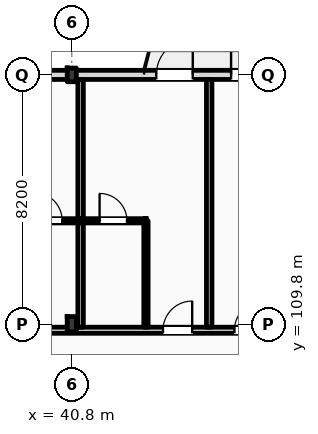
"""IFC4 building model, lengths in metres.
Left out: names, types, materials, properties, quantities, classifications, styles, units other than length and angle.
Written with IfcOpenShell. Run it as: python <this file> out.ifc"""

import sys

from ifc_helpers import new_model, si_unit, direction, frame, frame_2d, origin, origin_2d, place, context, subcontext, project, spatial, rectangle, i_section, extrude, element, fill, save


model = new_model("IFC4")
c1 = context("Model", 3, precision=1e-05, world=origin(), true_north=direction((0.0, 1.0)))
c2 = subcontext(c1, "Body", "Model", "MODEL_VIEW")
j1 = project(units=[si_unit("LENGTHUNIT", "METRE"), si_unit("PLANEANGLEUNIT", "RADIAN")], contexts=[c1])
p1 = place(None, origin())
s1 = spatial("IfcSite", under=j1, at=p1, CompositionType="ELEMENT")
p2 = place(p1, origin())
s2 = spatial("IfcBuilding", under=s1, at=p2, CompositionType="ELEMENT")
p3 = place(p2, frame((0.0, 0.0, 35.4)))
s3 = spatial("IfcBuildingStorey", under=s2, at=p3, CompositionType="ELEMENT", Elevation=35.4)
p4 = place(p3, frame((40.8, 109.8, 0.0), z_axis=(0.0, 0.0, 1.0), x_axis=(1.0, 0.0, 0.0)))
e1 = element("IfcColumn", 1, at=p4, inside=s3, PredefinedType="COLUMN", context=c2, shape_type="SweptSolid", body=[
    extrude(i_section(OverallWidth=0.3, OverallDepth=0.5, WebThickness=0.014, FlangeThickness=0.028, FilletRadius=0.027, at=origin_2d()), origin(), (0.0, 0.0, 1.0), 3.6),
])
p5 = place(p3, frame((40.8, 118.0, 0.0), z_axis=(0.0, 0.0, 1.0), x_axis=(1.0, 0.0, 0.0)))
e2 = element("IfcColumn", 2, at=p5, inside=s3, PredefinedType="COLUMN", context=c2, shape_type="SweptSolid", body=[
    extrude(i_section(OverallWidth=0.3, OverallDepth=0.45, WebThickness=0.014, FlangeThickness=0.026, FilletRadius=0.027, at=origin_2d()), origin(), (0.0, 0.0, 1.0), 3.6),
])
p6 = place(p3, frame((22.5, 118.0, 0.0), z_axis=(0.0, 0.0, 1.0), x_axis=(1.0, 0.0, 0.0)))
e3 = element("IfcWall", 3, at=p6, inside=s3, PredefinedType="STANDARD", context=c2, shape_type="SweptSolid", body=[
    extrude(rectangle(XDim=72.9, YDim=0.3, at=frame_2d((36.45, 0.0))), origin(), (0.0, 0.0, 1.0), 2.92),
])
p7 = place(p6, frame((0.91, 0.0, 0.9)))
e4 = element("IfcOpeningElement", 4, at=p7, cuts=e3, PredefinedType="OPENING", context=c2, shape_type="SweptSolid", body=[
    extrude(rectangle(XDim=0.9, YDim=1.84, at=frame_2d((0.45, 0.92))), frame((0.0, 0.16, 0.0), z_axis=(0.0, -1.0, 0.0), x_axis=(1.0, 0.0, 0.0)), (0.0, 0.0, 1.0), 0.32),
])
p8 = place(p6, frame((6.665, 0.0, 0.0)))
e5 = element("IfcOpeningElement", 5, at=p8, cuts=e3, PredefinedType="OPENING", context=c2, shape_type="SweptSolid", body=[
    extrude(rectangle(XDim=1.2, YDim=2.25, at=frame_2d((0.6, 1.125))), frame((0.0, 0.16, 0.0), z_axis=(0.0, -1.0, 0.0), x_axis=(1.0, 0.0, 0.0)), (0.0, 0.0, 1.0), 0.32),
])
p9 = place(p6, frame((11.355, 0.0, 0.9)))
e6 = element("IfcOpeningElement", 6, at=p9, cuts=e3, PredefinedType="OPENING", context=c2, shape_type="SweptSolid", body=[
    extrude(rectangle(XDim=1.1, YDim=1.5, at=frame_2d((0.55, 0.75))), frame((0.0, 0.16, 0.0), z_axis=(0.0, -1.0, 0.0), x_axis=(1.0, 0.0, 0.0)), (0.0, 0.0, 1.0), 0.32),
])
p10 = place(p6, frame((15.58, 0.0, 0.9)))
e7 = element("IfcOpeningElement", 7, at=p10, cuts=e3, PredefinedType="OPENING", context=c2, shape_type="SweptSolid", body=[
    extrude(rectangle(XDim=1.25, YDim=1.6, at=frame_2d((0.625, 0.8))), frame((0.0, 0.16, 0.0), z_axis=(0.0, -1.0, 0.0), x_axis=(1.0, 0.0, 0.0)), (0.0, 0.0, 1.0), 0.32),
])
p11 = place(p6, frame((21.08, 0.0, 0.0)))
e8 = element("IfcOpeningElement", 8, at=p11, cuts=e3, PredefinedType="OPENING", context=c2, shape_type="SweptSolid", body=[
    extrude(rectangle(XDim=1.2, YDim=2.25, at=frame_2d((0.6, 1.125))), frame((0.0, 0.16, 0.0), z_axis=(0.0, -1.0, 0.0), x_axis=(1.0, 0.0, 0.0)), (0.0, 0.0, 1.0), 0.32),
])
p12 = place(p6, frame((23.54, 0.0, 0.0)))
e9 = element("IfcOpeningElement", 9, at=p12, cuts=e3, PredefinedType="OPENING", context=c2, shape_type="SweptSolid", body=[
    extrude(rectangle(XDim=1.2, YDim=2.25, at=frame_2d((0.6, 1.125))), frame((0.0, 0.16, 0.0), z_axis=(0.0, -1.0, 0.0), x_axis=(1.0, 0.0, 0.0)), (0.0, 0.0, 1.0), 0.32),
])
p13 = place(p6, frame((28.83, 0.0, 0.9)))
e10 = element("IfcOpeningElement", 10, at=p13, cuts=e3, PredefinedType="OPENING", context=c2, shape_type="SweptSolid", body=[
    extrude(rectangle(XDim=1.75, YDim=1.84, at=frame_2d((0.875, 0.92))), frame((0.0, 0.16, 0.0), z_axis=(0.0, -1.0, 0.0), x_axis=(1.0, 0.0, 0.0)), (0.0, 0.0, 1.0), 0.32),
])
p14 = place(p6, frame((34.805, 0.0, 0.9)))
e11 = element("IfcOpeningElement", 11, at=p14, cuts=e3, PredefinedType="OPENING", context=c2, shape_type="SweptSolid", body=[
    extrude(rectangle(XDim=1.35, YDim=1.84, at=frame_2d((0.675, 0.92))), frame((0.0, 0.16, 0.0), z_axis=(0.0, -1.0, 0.0), x_axis=(1.0, 0.0, 0.0)), (0.0, 0.0, 1.0), 0.32),
])
p15 = place(p6, frame((38.105, 0.0, 0.0)))
e12 = element("IfcOpeningElement", 12, at=p15, cuts=e3, PredefinedType="OPENING", context=c2, shape_type="SweptSolid", body=[
    extrude(rectangle(XDim=1.2, YDim=2.25, at=frame_2d((0.6, 1.125))), frame((0.0, 0.16, 0.0), z_axis=(0.0, -1.0, 0.0), x_axis=(1.0, 0.0, 0.0)), (0.0, 0.0, 1.0), 0.32),
])
p16 = place(p6, frame((42.505, 0.0, 0.9)))
e13 = element("IfcOpeningElement", 13, at=p16, cuts=e3, PredefinedType="OPENING", context=c2, shape_type="SweptSolid", body=[
    extrude(rectangle(XDim=2.6, YDim=1.84, at=frame_2d((1.3, 0.92))), frame((0.0, 0.16, 0.0), z_axis=(0.0, -1.0, 0.0), x_axis=(1.0, 0.0, 0.0)), (0.0, 0.0, 1.0), 0.32),
])
p17 = place(p6, frame((46.2, 0.0, 0.9)))
e14 = element("IfcOpeningElement", 14, at=p17, cuts=e3, PredefinedType="OPENING", context=c2, shape_type="SweptSolid", body=[
    extrude(rectangle(XDim=1.8, YDim=1.84, at=frame_2d((0.9, 0.92))), frame((0.0, 0.16, 0.0), z_axis=(0.0, -1.0, 0.0), x_axis=(1.0, 0.0, 0.0)), (0.0, 0.0, 1.0), 0.32),
])
p18 = place(p6, frame((52.565, 0.0, 0.0)))
e15 = element("IfcOpeningElement", 15, at=p18, cuts=e3, PredefinedType="OPENING", context=c2, shape_type="SweptSolid", body=[
    extrude(rectangle(XDim=1.2, YDim=2.25, at=frame_2d((0.6, 1.125))), frame((0.0, 0.16, 0.0), z_axis=(0.0, -1.0, 0.0), x_axis=(1.0, 0.0, 0.0)), (0.0, 0.0, 1.0), 0.32),
])
p19 = place(p6, frame((55.305, 0.0, 0.9)))
e16 = element("IfcOpeningElement", 16, at=p19, cuts=e3, PredefinedType="OPENING", context=c2, shape_type="SweptSolid", body=[
    extrude(rectangle(XDim=1.2, YDim=1.8, at=frame_2d((0.6, 0.9))), frame((0.0, 0.16, 0.0), z_axis=(0.0, -1.0, 0.0), x_axis=(1.0, 0.0, 0.0)), (0.0, 0.0, 1.0), 0.32),
])
p20 = place(p6, frame((60.53, 0.0, 0.9)))
e17 = element("IfcOpeningElement", 17, at=p20, cuts=e3, PredefinedType="OPENING", context=c2, shape_type="SweptSolid", body=[
    extrude(rectangle(XDim=1.35, YDim=1.84, at=frame_2d((0.675, 0.92))), frame((0.0, 0.16, 0.0), z_axis=(0.0, -1.0, 0.0), x_axis=(1.0, 0.0, 0.0)), (0.0, 0.0, 1.0), 0.32),
])
p21 = place(p6, frame((65.955, 0.0, 0.9)))
e18 = element("IfcOpeningElement", 18, at=p21, cuts=e3, PredefinedType="OPENING", context=c2, shape_type="SweptSolid", body=[
    extrude(rectangle(XDim=1.35, YDim=1.84, at=frame_2d((0.675, 0.92))), frame((0.0, 0.16, 0.0), z_axis=(0.0, -1.0, 0.0), x_axis=(1.0, 0.0, 0.0)), (0.0, 0.0, 1.0), 0.32),
])
p22 = place(p6, frame((69.335, 0.0, 0.9)))
e19 = element("IfcOpeningElement", 19, at=p22, cuts=e3, PredefinedType="OPENING", context=c2, shape_type="SweptSolid", body=[
    extrude(rectangle(XDim=1.65, YDim=1.84, at=frame_2d((0.825, 0.92))), frame((0.0, 0.16, 0.0), z_axis=(0.0, -1.0, 0.0), x_axis=(1.0, 0.0, 0.0)), (0.0, 0.0, 1.0), 0.32),
])
p23 = place(p3, frame((10.65, 109.6, 0.0), z_axis=(0.0, 0.0, 1.0), x_axis=(1.0, 0.0, 0.0)))
e20 = element("IfcWall", 20, at=p23, inside=s3, PredefinedType="PARTITIONING", context=c2, shape_type="SweptSolid", body=[
    extrude(rectangle(XDim=84.61, YDim=0.2, at=frame_2d((42.305, 0.0))), origin(), (0.0, 0.0, 1.0), 2.82),
])
p24 = place(p23, frame((12.675, 0.0, 0.0)))
e21 = element("IfcOpeningElement", 21, at=p24, cuts=e20, PredefinedType="OPENING", context=c2, shape_type="SweptSolid", body=[
    extrude(rectangle(XDim=1.02, YDim=2.2, at=frame_2d((0.51, 1.1))), frame((0.0, 0.11, 0.0), z_axis=(0.0, -1.0, 0.0), x_axis=(1.0, 0.0, 0.0)), (0.0, 0.0, 1.0), 0.22),
])
p25 = place(p23, frame((19.62, 0.0, 0.0)))
e22 = element("IfcOpeningElement", 22, at=p25, cuts=e20, PredefinedType="OPENING", context=c2, shape_type="SweptSolid", body=[
    extrude(rectangle(XDim=1.02, YDim=2.2, at=frame_2d((0.51, 1.1))), frame((0.0, 0.11, 0.0), z_axis=(0.0, -1.0, 0.0), x_axis=(1.0, 0.0, 0.0)), (0.0, 0.0, 1.0), 0.22),
])
p26 = place(p23, frame((24.12, 0.0, 0.0)))
e23 = element("IfcOpeningElement", 23, at=p26, cuts=e20, PredefinedType="OPENING", context=c2, shape_type="SweptSolid", body=[
    extrude(rectangle(XDim=1.02, YDim=2.2, at=frame_2d((0.51, 1.1))), frame((0.0, 0.11, 0.0), z_axis=(0.0, -1.0, 0.0), x_axis=(1.0, 0.0, 0.0)), (0.0, 0.0, 1.0), 0.22),
])
p27 = place(p23, frame((26.47, 0.0, 0.0)))
e24 = element("IfcOpeningElement", 24, at=p27, cuts=e20, PredefinedType="OPENING", context=c2, shape_type="SweptSolid", body=[
    extrude(rectangle(XDim=1.02, YDim=2.2, at=frame_2d((0.51, 1.1))), frame((0.0, 0.11, 0.0), z_axis=(0.0, -1.0, 0.0), x_axis=(1.0, 0.0, 0.0)), (0.0, 0.0, 1.0), 0.22),
])
p28 = place(p23, frame((33.15, 0.0, 0.0)))
e25 = element("IfcOpeningElement", 25, at=p28, cuts=e20, PredefinedType="OPENING", context=c2, shape_type="SweptSolid", body=[
    extrude(rectangle(XDim=0.96, YDim=2.2, at=frame_2d((0.48, 1.1))), frame((0.0, 0.11, 0.0), z_axis=(0.0, -1.0, 0.0), x_axis=(1.0, 0.0, 0.0)), (0.0, 0.0, 1.0), 0.22),
])
p29 = place(p23, frame((35.5, 0.0, 0.0)))
e26 = element("IfcOpeningElement", 26, at=p29, cuts=e20, PredefinedType="OPENING", context=c2, shape_type="SweptSolid", body=[
    extrude(rectangle(XDim=0.96, YDim=2.2, at=frame_2d((0.48, 1.1))), frame((0.0, 0.11, 0.0), z_axis=(0.0, -1.0, 0.0), x_axis=(1.0, 0.0, 0.0)), (0.0, 0.0, 1.0), 0.22),
])
p30 = place(p23, frame((42.15, 0.0, 0.0)))
e27 = element("IfcOpeningElement", 27, at=p30, cuts=e20, PredefinedType="OPENING", context=c2, shape_type="SweptSolid", body=[
    extrude(rectangle(XDim=0.96, YDim=2.2, at=frame_2d((0.48, 1.1))), frame((0.0, 0.11, 0.0), z_axis=(0.0, -1.0, 0.0), x_axis=(1.0, 0.0, 0.0)), (0.0, 0.0, 1.0), 0.22),
])
p31 = place(p23, frame((47.15, 0.0, 0.0)))
e28 = element("IfcOpeningElement", 28, at=p31, cuts=e20, PredefinedType="OPENING", context=c2, shape_type="SweptSolid", body=[
    extrude(rectangle(XDim=0.96, YDim=2.2, at=frame_2d((0.48, 1.1))), frame((0.0, 0.11, 0.0), z_axis=(0.0, -1.0, 0.0), x_axis=(1.0, 0.0, 0.0)), (0.0, 0.0, 1.0), 0.22),
])
p32 = place(p23, frame((51.15, 0.0, 0.0)))
e29 = element("IfcOpeningElement", 29, at=p32, cuts=e20, PredefinedType="OPENING", context=c2, shape_type="SweptSolid", body=[
    extrude(rectangle(XDim=0.96, YDim=2.2, at=frame_2d((0.48, 1.1))), frame((0.0, 0.11, 0.0), z_axis=(0.0, -1.0, 0.0), x_axis=(1.0, 0.0, 0.0)), (0.0, 0.0, 1.0), 0.22),
])
p33 = place(p23, frame((55.65, 0.0, 0.0)))
e30 = element("IfcOpeningElement", 30, at=p33, cuts=e20, PredefinedType="OPENING", context=c2, shape_type="SweptSolid", body=[
    extrude(rectangle(XDim=0.96, YDim=2.2, at=frame_2d((0.48, 1.1))), frame((0.0, 0.11, 0.0), z_axis=(0.0, -1.0, 0.0), x_axis=(1.0, 0.0, 0.0)), (0.0, 0.0, 1.0), 0.22),
])
p34 = place(p23, frame((58.0, 0.0, 0.0)))
e31 = element("IfcOpeningElement", 31, at=p34, cuts=e20, PredefinedType="OPENING", context=c2, shape_type="SweptSolid", body=[
    extrude(rectangle(XDim=0.96, YDim=2.2, at=frame_2d((0.48, 1.1))), frame((0.0, 0.11, 0.0), z_axis=(0.0, -1.0, 0.0), x_axis=(1.0, 0.0, 0.0)), (0.0, 0.0, 1.0), 0.22),
])
p35 = place(p23, frame((64.65, 0.0, 0.0)))
e32 = element("IfcOpeningElement", 32, at=p35, cuts=e20, PredefinedType="OPENING", context=c2, shape_type="SweptSolid", body=[
    extrude(rectangle(XDim=0.96, YDim=2.2, at=frame_2d((0.48, 1.1))), frame((0.0, 0.11, 0.0), z_axis=(0.0, -1.0, 0.0), x_axis=(1.0, 0.0, 0.0)), (0.0, 0.0, 1.0), 0.22),
])
p36 = place(p23, frame((66.75, 0.0, 0.0)))
e33 = element("IfcOpeningElement", 33, at=p36, cuts=e20, PredefinedType="OPENING", context=c2, shape_type="SweptSolid", body=[
    extrude(rectangle(XDim=0.96, YDim=2.2, at=frame_2d((0.48, 1.1))), frame((0.0, 0.11, 0.0), z_axis=(0.0, -1.0, 0.0), x_axis=(1.0, 0.0, 0.0)), (0.0, 0.0, 1.0), 0.22),
])
p37 = place(p23, frame((73.65, 0.0, 0.0)))
e34 = element("IfcOpeningElement", 34, at=p37, cuts=e20, PredefinedType="OPENING", context=c2, shape_type="SweptSolid", body=[
    extrude(rectangle(XDim=0.96, YDim=2.2, at=frame_2d((0.48, 1.1))), frame((0.0, 0.11, 0.0), z_axis=(0.0, -1.0, 0.0), x_axis=(1.0, 0.0, 0.0)), (0.0, 0.0, 1.0), 0.22),
])
p38 = place(p23, frame((78.4, 0.0, 0.0)))
e35 = element("IfcOpeningElement", 35, at=p38, cuts=e20, PredefinedType="OPENING", context=c2, shape_type="SweptSolid", body=[
    extrude(rectangle(XDim=0.96, YDim=2.2, at=frame_2d((0.48, 1.1))), frame((0.0, 0.11, 0.0), z_axis=(0.0, -1.0, 0.0), x_axis=(1.0, 0.0, 0.0)), (0.0, 0.0, 1.0), 0.22),
])
p39 = place(p23, frame((80.455, 0.0, 0.0)))
e36 = element("IfcOpeningElement", 36, at=p39, cuts=e20, PredefinedType="OPENING", context=c2, shape_type="SweptSolid", body=[
    extrude(rectangle(XDim=0.96, YDim=2.2, at=frame_2d((0.48, 1.1))), frame((0.0, 0.11, 0.0), z_axis=(0.0, -1.0, 0.0), x_axis=(1.0, 0.0, 0.0)), (0.0, 0.0, 1.0), 0.22),
])
p40 = place(p23, frame((2.716, 0.0, 0.0)))
e37 = element("IfcOpeningElement", 37, at=p40, cuts=e20, PredefinedType="OPENING", context=c2, shape_type="SweptSolid", body=[
    extrude(rectangle(XDim=1.35, YDim=2.25, at=frame_2d((0.675, 1.125))), frame((0.0, 0.11, 0.0), z_axis=(0.0, -1.0, 0.0), x_axis=(1.0, 0.0, 0.0)), (0.0, 0.0, 1.0), 0.22),
])
p41 = place(p23, frame((6.65, 0.0, 0.0)))
e38 = element("IfcOpeningElement", 38, at=p41, cuts=e20, PredefinedType="OPENING", context=c2, shape_type="SweptSolid", body=[
    extrude(rectangle(XDim=1.35, YDim=2.25, at=frame_2d((0.675, 1.125))), frame((0.0, 0.11, 0.0), z_axis=(0.0, -1.0, 0.0), x_axis=(1.0, 0.0, 0.0)), (0.0, 0.0, 1.0), 0.22),
])
p42 = place(p23, frame((10.583, 0.0, 0.0)))
e39 = element("IfcOpeningElement", 39, at=p42, cuts=e20, PredefinedType="OPENING", context=c2, shape_type="SweptSolid", body=[
    extrude(rectangle(XDim=1.35, YDim=2.25, at=frame_2d((0.675, 1.125))), frame((0.0, 0.11, 0.0), z_axis=(0.0, -1.0, 0.0), x_axis=(1.0, 0.0, 0.0)), (0.0, 0.0, 1.0), 0.22),
])
p43 = place(p3, frame((41.09, 109.7, 0.0), z_axis=(0.0, 0.0, 1.0), x_axis=(0.0, 1.0, 0.0)))
e40 = element("IfcWall", 40, at=p43, inside=s3, PredefinedType="PARTITIONING", context=c2, shape_type="SweptSolid", body=[
    extrude(rectangle(XDim=8.15, YDim=0.18, at=frame_2d((4.075, 0.0))), origin(), (0.0, 0.0, 1.0), 3.38),
])
p44 = place(p3, frame((38.94, 113.2, 0.0), z_axis=(0.0, 0.0, 1.0), x_axis=(1.0, 0.0, 0.0)))
e41 = element("IfcWall", 41, at=p44, inside=s3, PredefinedType="PARTITIONING", context=c2, shape_type="SweptSolid", body=[
    extrude(rectangle(XDim=2.15, YDim=0.14, at=frame_2d((1.075, 0.0))), origin(), (0.0, 0.0, 1.0), 3.38),
])
p45 = place(p44, frame((0.605, 0.0, 0.0)))
e42 = element("IfcOpeningElement", 42, at=p45, cuts=e41, PredefinedType="OPENING", context=c2, shape_type="SweptSolid", body=[
    extrude(rectangle(XDim=0.94, YDim=2.15, at=frame_2d((0.47, 1.075))), frame((0.0, 0.08, 0.0), z_axis=(0.0, -1.0, 0.0), x_axis=(1.0, 0.0, 0.0)), (0.0, 0.0, 1.0), 0.16),
])
p46 = place(p3, frame((45.32, 109.7, 0.0), z_axis=(0.0, 0.0, 1.0), x_axis=(0.0, 1.0, 0.0)))
e43 = element("IfcWall", 43, at=p46, inside=s3, PredefinedType="PARTITIONING", context=c2, shape_type="SweptSolid", body=[
    extrude(rectangle(XDim=8.15, YDim=0.18, at=frame_2d((4.075, 0.0))), origin(), (0.0, 0.0, 1.0), 3.38),
])
p47 = place(p3, frame((43.24, 109.7, 0.0), z_axis=(0.0, 0.0, 1.0), x_axis=(0.0, 1.0, 0.0)))
e44 = element("IfcWall", 44, at=p47, inside=s3, PredefinedType="PARTITIONING", context=c2, shape_type="SweptSolid", body=[
    extrude(rectangle(XDim=3.5, YDim=0.14, at=frame_2d((1.75, 0.0))), origin(), (0.0, 0.0, 1.0), 3.07),
])
p48 = place(p3, frame((41.09, 113.2, 0.0), z_axis=(0.0, 0.0, 1.0), x_axis=(1.0, 0.0, 0.0)))
e45 = element("IfcWall", 45, at=p48, inside=s3, PredefinedType="PARTITIONING", context=c2, shape_type="SweptSolid", body=[
    extrude(rectangle(XDim=2.15, YDim=0.14, at=frame_2d((1.075, 0.0))), origin(), (0.0, 0.0, 1.0), 3.38),
])
p49 = place(p48, frame((0.625, 0.0, 0.0)))
e46 = element("IfcOpeningElement", 46, at=p49, cuts=e45, PredefinedType="OPENING", context=c2, shape_type="SweptSolid", body=[
    extrude(rectangle(XDim=0.9, YDim=2.1, at=frame_2d((0.45, 1.05))), frame((0.0, 0.08, 0.0), z_axis=(0.0, -1.0, 0.0), x_axis=(1.0, 0.0, 0.0)), (0.0, 0.0, 1.0), 0.16),
])
p50 = place(p11, origin())
e47 = element("IfcDoor", 47, at=p50, inside=s3, OperationType="SINGLE_SWING_RIGHT", PredefinedType="DOOR", context=c2, shape_type="SweptSolid", body=[
    extrude(rectangle(XDim=1.2, YDim=2.25, at=frame_2d((0.6, 1.125))), frame((0.0, 0.025, 0.0), z_axis=(0.0, -1.0, 0.0), x_axis=(1.0, 0.0, 0.0)), (0.0, 0.0, 1.0), 0.05),
])
fill(e8, e47)
p51 = place(p12, origin())
e48 = element("IfcDoor", 48, at=p51, inside=s3, OperationType="SINGLE_SWING_LEFT", PredefinedType="DOOR", context=c2, shape_type="SweptSolid", body=[
    extrude(rectangle(XDim=1.2, YDim=2.25, at=frame_2d((0.6, 1.125))), frame((0.0, 0.025, 0.0), z_axis=(0.0, -1.0, 0.0), x_axis=(1.0, 0.0, 0.0)), (0.0, 0.0, 1.0), 0.05),
])
fill(e9, e48)
p52 = place(p45, origin())
e49 = element("IfcDoor", 49, at=p52, inside=s3, OperationType="SINGLE_SWING_LEFT", PredefinedType="DOOR", context=c2, shape_type="SweptSolid", body=[
    extrude(rectangle(XDim=0.94, YDim=2.15, at=frame_2d((0.47, 1.075))), frame((0.0, 0.025, 0.0), z_axis=(0.0, -1.0, 0.0), x_axis=(1.0, 0.0, 0.0)), (0.0, 0.0, 1.0), 0.05),
])
fill(e42, e49)
p53 = place(p28, origin())
e50 = element("IfcDoor", 50, at=p53, inside=s3, OperationType="SINGLE_SWING_RIGHT", PredefinedType="DOOR", context=c2, shape_type="SweptSolid", body=[
    extrude(rectangle(XDim=0.96, YDim=2.2, at=frame_2d((0.48, 1.1))), frame((0.0, 0.025, 0.0), z_axis=(0.0, -1.0, 0.0), x_axis=(1.0, 0.0, 0.0)), (0.0, 0.0, 1.0), 0.05),
])
fill(e25, e50)
p54 = place(p49, origin())
e51 = element("IfcDoor", 51, at=p54, inside=s3, OperationType="SINGLE_SWING_LEFT", PredefinedType="DOOR", context=c2, shape_type="SweptSolid", body=[
    extrude(rectangle(XDim=0.9, YDim=2.1, at=frame_2d((0.45, 1.05))), frame((0.0, 0.025, 0.0), z_axis=(0.0, -1.0, 0.0), x_axis=(1.0, 0.0, 0.0)), (0.0, 0.0, 1.0), 0.05),
])
fill(e46, e51)
p55 = place(p29, origin())
e52 = element("IfcDoor", 52, at=p55, inside=s3, OperationType="SINGLE_SWING_RIGHT", PredefinedType="DOOR", context=c2, shape_type="SweptSolid", body=[
    extrude(rectangle(XDim=0.96, YDim=2.2, at=frame_2d((0.48, 1.1))), frame((0.0, 0.025, 0.0), z_axis=(0.0, -1.0, 0.0), x_axis=(1.0, 0.0, 0.0)), (0.0, 0.0, 1.0), 0.05),
])
fill(e26, e52)
save(model, sys.argv[1])
